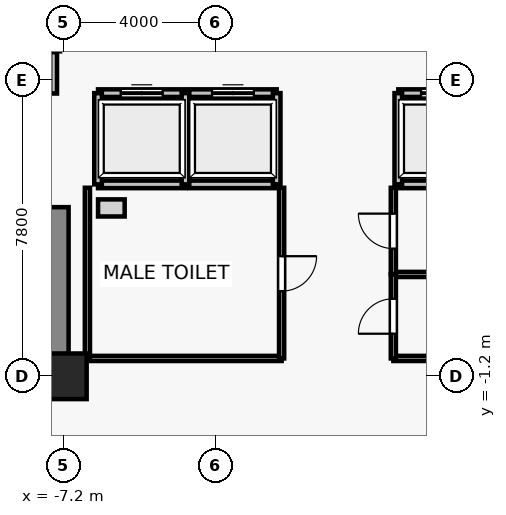
"""IFC4 building model, lengths in metres.
Left out: names, types, materials, properties, quantities, classifications, styles, units other than length and angle.
Written with IfcOpenShell. Run it as: python <this file> out.ifc"""

import sys

from ifc_helpers import new_model, si_unit, direction, frame, frame_2d, origin, origin_2d, place, context, subcontext, project, spatial, rectangle, extrude, source, transform, mapped, element, fill, save


model = new_model("IFC4")
c1 = context("Model", 3, precision=1e-05, world=origin(), true_north=direction((0.0, 1.0)))
c2 = subcontext(c1, "Body", "Model", "MODEL_VIEW")
j1 = project(units=[si_unit("LENGTHUNIT", "METRE"), si_unit("PLANEANGLEUNIT", "RADIAN")], contexts=[c1])
p1 = place(None, origin())
s1 = spatial("IfcSite", under=j1, at=p1, CompositionType="ELEMENT")
p2 = place(p1, origin())
s2 = spatial("IfcBuilding", under=s1, at=p2, CompositionType="ELEMENT")
p3 = place(p2, origin())
s3 = spatial("IfcBuildingStorey", under=s2, at=p3, CompositionType="ELEMENT", Elevation=0.0)
p4 = place(p3, frame((-7.2, -1.2, 0.0), z_axis=(0.0, 0.0, 1.0), x_axis=(1.0, 0.0, 0.0)))
e1 = element("IfcColumn", 1, at=p4, inside=s3, PredefinedType="COLUMN", context=c2, shape_type="SweptSolid", body=[
    extrude(rectangle(XDim=1.2, YDim=1.2, at=origin_2d()), origin(), (0.0, 0.0, 1.0), 5.0),
])
p5 = place(p3, frame((-7.4, -0.75, 0.0), z_axis=(0.0, 0.0, 1.0), x_axis=(0.0, 1.0, 0.0)))
e2 = element("IfcWall", 2, at=p5, inside=s3, PredefinedType="SHEAR", context=c2, shape_type="SweptSolid", body=[
    extrude(rectangle(XDim=4.0, YDim=0.65, at=frame_2d((2.0, 0.0))), origin(), (0.0, 0.0, 1.0), 4.7),
])
p6 = place(p3, frame((-4.0, 3.85, 0.0), z_axis=(0.0, 0.0, 1.0), x_axis=(-1.0, 0.0, 0.0)))
e3 = element("IfcWall", 3, at=p6, inside=s3, PredefinedType="SOLIDWALL", context=c2, shape_type="SweptSolid", body=[
    extrude(rectangle(XDim=2.3, YDim=0.2, at=frame_2d((1.15, 0.0))), origin(), (0.0, 0.0, 1.0), 4.7),
])
p7 = place(p3, frame((-6.3, 6.25, 0.0), z_axis=(0.0, 0.0, 1.0), x_axis=(1.0, 0.0, 0.0)))
e4 = element("IfcWall", 4, at=p7, inside=s3, PredefinedType="SOLIDWALL", context=c2, shape_type="SweptSolid", body=[
    extrude(rectangle(XDim=2.3, YDim=0.2, at=frame_2d((1.15, 0.0))), origin(), (0.0, 0.0, 1.0), 4.7),
])
p8 = place(p7, frame((0.6, 0.0, 0.0)))
e5 = element("IfcOpeningElement", 5, at=p8, cuts=e4, PredefinedType="OPENING", context=c2, shape_type="SweptSolid", body=[
    extrude(rectangle(XDim=1.1, YDim=2.2, at=frame_2d((0.55, 1.1))), frame((0.0, 0.11, 0.0), z_axis=(0.0, -1.0, 0.0), x_axis=(1.0, 0.0, 0.0)), (0.0, 0.0, 1.0), 0.22),
])
for number, where, z_axis, x_axis in (
    (6, (-6.3, 3.85, 0.0), (0.0, 0.0, 1.0), (0.0, 1.0, 0.0)),
    (7, (-4.0, 6.25, 0.0), (0.0, 0.0, 1.0), (0.0, -1.0, 0.0)),
):
    element("IfcWall", number, at=place(p3, frame(where, z_axis=z_axis, x_axis=x_axis)), inside=s3, PredefinedType="SOLIDWALL", context=c2, shape_type="SweptSolid", body=[
        extrude(rectangle(XDim=2.4, YDim=0.2, at=frame_2d((1.2, 0.0))), origin(), (0.0, 0.0, 1.0), 4.7),
    ])
p9 = place(p3, frame((-1.6, 3.85, 0.0), z_axis=(0.0, 0.0, 1.0), x_axis=(-1.0, 0.0, 0.0)))
e8 = element("IfcWall", 8, at=p9, inside=s3, PredefinedType="SOLIDWALL", context=c2, shape_type="SweptSolid", body=[
    extrude(rectangle(XDim=2.3, YDim=0.2, at=frame_2d((1.15, 0.0))), origin(), (0.0, 0.0, 1.0), 4.7),
])
p10 = place(p3, frame((-3.9, 6.25, 0.0), z_axis=(0.0, 0.0, 1.0), x_axis=(1.0, 0.0, 0.0)))
e9 = element("IfcWall", 9, at=p10, inside=s3, PredefinedType="SOLIDWALL", context=c2, shape_type="SweptSolid", body=[
    extrude(rectangle(XDim=2.3, YDim=0.2, at=frame_2d((1.15, 0.0))), origin(), (0.0, 0.0, 1.0), 4.7),
])
p11 = place(p10, frame((0.6, 0.0, 0.0)))
e10 = element("IfcOpeningElement", 10, at=p11, cuts=e9, PredefinedType="OPENING", context=c2, shape_type="SweptSolid", body=[
    extrude(rectangle(XDim=1.1, YDim=2.2, at=frame_2d((0.55, 1.1))), frame((0.0, 0.11, 0.0), z_axis=(0.0, -1.0, 0.0), x_axis=(1.0, 0.0, 0.0)), (0.0, 0.0, 1.0), 0.22),
])
p12 = place(p3, frame((-1.6, 6.25, 0.0), z_axis=(0.0, 0.0, 1.0), x_axis=(0.0, -1.0, 0.0)))
e11 = element("IfcWall", 11, at=p12, inside=s3, PredefinedType="SOLIDWALL", context=c2, shape_type="SweptSolid", body=[
    extrude(rectangle(XDim=2.4, YDim=0.2, at=frame_2d((1.2, 0.0))), origin(), (0.0, 0.0, 1.0), 4.7),
])
p13 = place(p3, frame((3.9, 3.85, 0.0), z_axis=(0.0, 0.0, 1.0), x_axis=(-1.0, 0.0, 0.0)))
e12 = element("IfcWall", 12, at=p13, inside=s3, PredefinedType="SOLIDWALL", context=c2, shape_type="SweptSolid", body=[
    extrude(rectangle(XDim=2.3, YDim=0.2, at=frame_2d((1.15, 0.0))), origin(), (0.0, 0.0, 1.0), 4.7),
])
p14 = place(p3, frame((1.6, 6.25, 0.0), z_axis=(0.0, 0.0, 1.0), x_axis=(1.0, 0.0, 0.0)))
e13 = element("IfcWall", 13, at=p14, inside=s3, PredefinedType="SOLIDWALL", context=c2, shape_type="SweptSolid", body=[
    extrude(rectangle(XDim=2.3, YDim=0.2, at=frame_2d((1.15, 0.0))), origin(), (0.0, 0.0, 1.0), 4.7),
])
p15 = place(p14, frame((0.6, 0.0, 0.0)))
e14 = element("IfcOpeningElement", 14, at=p15, cuts=e13, PredefinedType="OPENING", context=c2, shape_type="SweptSolid", body=[
    extrude(rectangle(XDim=1.1, YDim=2.2, at=frame_2d((0.55, 1.1))), frame((0.0, 0.11, 0.0), z_axis=(0.0, -1.0, 0.0), x_axis=(1.0, 0.0, 0.0)), (0.0, 0.0, 1.0), 0.22),
])
p16 = place(p3, frame((1.6, 3.85, 0.0), z_axis=(0.0, 0.0, 1.0), x_axis=(0.0, 1.0, 0.0)))
e15 = element("IfcWall", 15, at=p16, inside=s3, PredefinedType="SOLIDWALL", context=c2, shape_type="SweptSolid", body=[
    extrude(rectangle(XDim=2.4, YDim=0.2, at=frame_2d((1.2, 0.0))), origin(), (0.0, 0.0, 1.0), 4.7),
])
p17 = place(p3, frame((-7.4, 7.35, 0.0), z_axis=(0.0, 0.0, 1.0), x_axis=(-1.0, 0.0, 0.0)))
e16 = element("IfcWall", 16, at=p17, inside=s3, PredefinedType="SOLIDWALL", context=c2, shape_type="SweptSolid", body=[
    extrude(rectangle(XDim=2.2, YDim=0.2, at=frame_2d((1.1, 0.0))), origin(), (0.0, 0.0, 1.0), 3.79),
])
p18 = place(p17, frame((0.66, 0.0, 0.0)))
e17 = element("IfcOpeningElement", 17, at=p18, cuts=e16, PredefinedType="OPENING", context=c2, shape_type="SweptSolid", body=[
    extrude(rectangle(XDim=0.88, YDim=2.1, at=frame_2d((0.44, 1.05))), frame((0.0, 0.11, 0.0), z_axis=(0.0, -1.0, 0.0), x_axis=(1.0, 0.0, 0.0)), (0.0, 0.0, 1.0), 0.22),
])
p19 = place(p3, frame((-7.47, 7.33, 0.0), z_axis=(0.0, 0.0, 1.0), x_axis=(0.0, -1.0, 0.0)))
e18 = element("IfcWall", 18, at=p19, inside=s3, PredefinedType="PARTITIONING", context=c2, shape_type="SweptSolid", body=[
    extrude(rectangle(XDim=1.09, YDim=0.18, at=frame_2d((0.545, 0.0))), origin(), (0.0, 0.0, 1.0), 3.79),
])
p20 = place(p3, frame((-1.47, -0.73, 0.0), z_axis=(0.0, 0.0, 1.0), x_axis=(-1.0, 0.0, 0.0)))
e19 = element("IfcWall", 19, at=p20, inside=s3, PredefinedType="PARTITIONING", context=c2, shape_type="SweptSolid", body=[
    extrude(rectangle(XDim=5.11, YDim=0.135, at=frame_2d((2.555, 0.0))), origin(), (0.0, 0.0, 1.0), 4.7),
])
p21 = place(p3, frame((-6.58, -0.73, 0.0), z_axis=(0.0, 0.0, 1.0), x_axis=(0.0, 1.0, 0.0)))
e20 = element("IfcWall", 20, at=p21, inside=s3, PredefinedType="PARTITIONING", context=c2, shape_type="SweptSolid", body=[
    extrude(rectangle(XDim=4.49, YDim=0.135, at=frame_2d((2.245, 0.0))), origin(), (0.0, 0.0, 1.0), 4.073),
])
p22 = place(p3, frame((-1.47, 3.76, 0.0), z_axis=(0.0, 0.0, 1.0), x_axis=(0.0, -1.0, 0.0)))
e21 = element("IfcWall", 21, at=p22, inside=s3, PredefinedType="PARTITIONING", context=c2, shape_type="SweptSolid", body=[
    extrude(rectangle(XDim=4.49, YDim=0.135, at=frame_2d((2.245, 0.0))), origin(), (0.0, 0.0, 1.0), 4.073),
])
p23 = place(p22, frame((1.8, 0.0, 0.0)))
e22 = element("IfcOpeningElement", 22, at=p23, cuts=e21, PredefinedType="OPENING", context=c2, shape_type="SweptSolid", body=[
    extrude(rectangle(XDim=0.92, YDim=2.1, at=frame_2d((0.46, 1.05))), frame((0.0, 0.077, 0.0), z_axis=(0.0, -1.0, 0.0), x_axis=(1.0, 0.0, 0.0)), (0.0, 0.0, 1.0), 0.155),
])
p24 = place(p3, frame((6.58, 1.48, 0.0), z_axis=(0.0, 0.0, 1.0), x_axis=(-1.0, 0.0, 0.0)))
e23 = element("IfcWall", 23, at=p24, inside=s3, PredefinedType="PARTITIONING", context=c2, shape_type="SweptSolid", body=[
    extrude(rectangle(XDim=5.11, YDim=0.135, at=frame_2d((2.555, 0.0))), origin(), (0.0, 0.0, 1.0), 4.7),
])
p25 = place(p3, frame((1.47, 1.48, 0.0), z_axis=(0.0, 0.0, 1.0), x_axis=(0.0, 1.0, 0.0)))
e24 = element("IfcWall", 24, at=p25, inside=s3, PredefinedType="PARTITIONING", context=c2, shape_type="SweptSolid", body=[
    extrude(rectangle(XDim=2.28, YDim=0.135, at=frame_2d((1.14, 0.0))), origin(), (0.0, 0.0, 1.0), 4.073),
])
p26 = place(p25, frame((0.68, 0.0, 0.0)))
e25 = element("IfcOpeningElement", 25, at=p26, cuts=e24, PredefinedType="OPENING", context=c2, shape_type="SweptSolid", body=[
    extrude(rectangle(XDim=0.92, YDim=2.1, at=frame_2d((0.46, 1.05))), frame((0.0, 0.077, 0.0), z_axis=(0.0, -1.0, 0.0), x_axis=(1.0, 0.0, 0.0)), (0.0, 0.0, 1.0), 0.155),
])
p27 = place(p3, frame((4.18, -0.73, 0.0), z_axis=(0.0, 0.0, 1.0), x_axis=(-1.0, 0.0, 0.0)))
e26 = element("IfcWall", 26, at=p27, inside=s3, PredefinedType="PARTITIONING", context=c2, shape_type="SweptSolid", body=[
    extrude(rectangle(XDim=2.71, YDim=0.135, at=frame_2d((1.355, 0.0))), origin(), (0.0, 0.0, 1.0), 4.7),
])
p28 = place(p3, frame((1.47, -0.73, 0.0), z_axis=(0.0, 0.0, 1.0), x_axis=(0.0, 1.0, 0.0)))
e27 = element("IfcWall", 27, at=p28, inside=s3, PredefinedType="PARTITIONING", context=c2, shape_type="SweptSolid", body=[
    extrude(rectangle(XDim=2.21, YDim=0.135, at=frame_2d((1.105, 0.0))), origin(), (0.0, 0.0, 1.0), 4.7),
])
p29 = place(p28, frame((0.65, 0.0, 0.0)))
e28 = element("IfcOpeningElement", 28, at=p29, cuts=e27, PredefinedType="OPENING", context=c2, shape_type="SweptSolid", body=[
    extrude(rectangle(XDim=0.92, YDim=2.1, at=frame_2d((0.46, 1.05))), frame((0.0, 0.077, 0.0), z_axis=(0.0, -1.0, 0.0), x_axis=(1.0, 0.0, 0.0)), (0.0, 0.0, 1.0), 0.155),
])
m1 = source(origin(), c2, "Body", "SweptSolid", [
    extrude(rectangle(XDim=1.1, YDim=2.2, at=frame_2d((0.55, 1.1))), frame((0.0, 0.025, 0.0), z_axis=(0.0, -1.0, 0.0), x_axis=(1.0, 0.0, 0.0)), (0.0, 0.0, 1.0), 0.05),
])
p30 = place(p8, origin())
e29 = element("IfcDoor", 29, at=p30, inside=s3, OperationType="DOUBLE_DOOR_SLIDING", PredefinedType="DOOR", context=c2, shape_type="MappedRepresentation", body=[
    mapped(m1, transform((0.0, 0.0, 0.0), x_axis=(1.0, 0.0, 0.0), y_axis=(0.0, 1.0, 0.0), z_axis=(0.0, 0.0, 1.0), scale=1.0)),
])
fill(e5, e29)
p31 = place(p11, origin())
e30 = element("IfcDoor", 30, at=p31, inside=s3, OperationType="DOUBLE_DOOR_SLIDING", PredefinedType="DOOR", context=c2, shape_type="MappedRepresentation", body=[
    mapped(m1, transform((0.0, 0.0, 0.0), x_axis=(1.0, 0.0, 0.0), y_axis=(0.0, 1.0, 0.0), z_axis=(0.0, 0.0, 1.0), scale=1.0)),
])
fill(e10, e30)
p32 = place(p15, origin())
e31 = element("IfcDoor", 31, at=p32, inside=s3, OperationType="DOUBLE_DOOR_SLIDING", PredefinedType="DOOR", context=c2, shape_type="MappedRepresentation", body=[
    mapped(m1, transform((0.0, 0.0, 0.0), x_axis=(1.0, 0.0, 0.0), y_axis=(0.0, 1.0, 0.0), z_axis=(0.0, 0.0, 1.0), scale=1.0)),
])
fill(e14, e31)
m2 = source(origin(), c2, "Body", "SweptSolid", [
    extrude(rectangle(XDim=0.92, YDim=2.1, at=frame_2d((0.46, 1.05))), frame((0.0, 0.025, 0.0), z_axis=(0.0, -1.0, 0.0), x_axis=(1.0, 0.0, 0.0)), (0.0, 0.0, 1.0), 0.05),
])
p33 = place(p23, origin())
e32 = element("IfcDoor", 32, at=p33, inside=s3, OperationType="SINGLE_SWING_LEFT", PredefinedType="DOOR", context=c2, shape_type="MappedRepresentation", body=[
    mapped(m2, transform((0.0, 0.0, 0.0), x_axis=(1.0, 0.0, 0.0), y_axis=(0.0, 1.0, 0.0), z_axis=(0.0, 0.0, 1.0), scale=1.0)),
])
fill(e22, e32)
p34 = place(p26, origin())
e33 = element("IfcDoor", 33, at=p34, inside=s3, OperationType="SINGLE_SWING_RIGHT", PredefinedType="DOOR", context=c2, shape_type="MappedRepresentation", body=[
    mapped(m2, transform((0.0, 0.0, 0.0), x_axis=(1.0, 0.0, 0.0), y_axis=(0.0, 1.0, 0.0), z_axis=(0.0, 0.0, 1.0), scale=1.0)),
])
fill(e25, e33)
p35 = place(p29, origin())
e34 = element("IfcDoor", 34, at=p35, inside=s3, OperationType="SINGLE_SWING_LEFT", PredefinedType="DOOR", context=c2, shape_type="MappedRepresentation", body=[
    mapped(m2, transform((0.0, 0.0, 0.0), x_axis=(1.0, 0.0, 0.0), y_axis=(0.0, 1.0, 0.0), z_axis=(0.0, 0.0, 1.0), scale=1.0)),
])
fill(e28, e34)
save(model, sys.argv[1])
